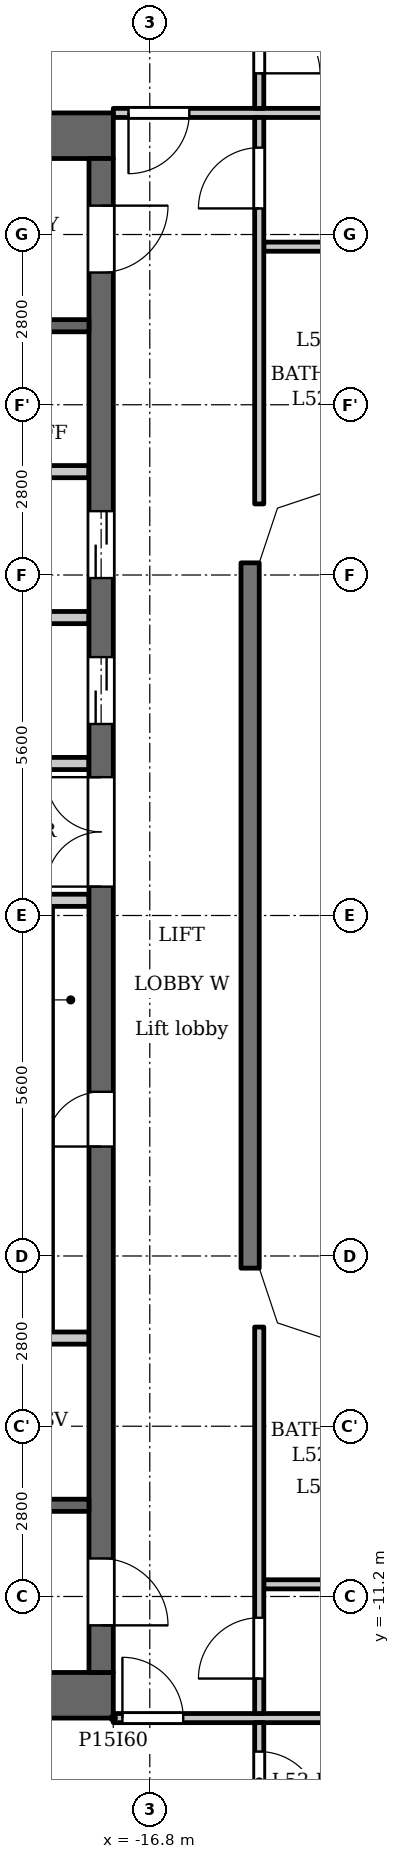
"""IFC4 building model, lengths in metres.
Left out: names, types, materials, properties, quantities, classifications, styles, units other than length and angle.
Written with IfcOpenShell. Run it as: python <this file> out.ifc"""

import sys

from ifc_helpers import new_model, si_unit, direction, frame, frame_2d, origin, place, context, subcontext, project, spatial, polyline, rectangle, outline, extrude, element, fill, save


model = new_model("IFC4")
c1 = context("Model", 3, precision=1e-05, world=origin(), true_north=direction((0.0, 1.0)))
c2 = subcontext(c1, "Body", "Model", "MODEL_VIEW")
j1 = project(units=[si_unit("LENGTHUNIT", "METRE"), si_unit("PLANEANGLEUNIT", "RADIAN")], contexts=[c1])
p1 = place(None, origin())
s1 = spatial("IfcSite", under=j1, at=p1, CompositionType="ELEMENT")
p2 = place(p1, origin())
s2 = spatial("IfcBuilding", under=s1, at=p2, CompositionType="ELEMENT")
p3 = place(p2, frame((0.0, 0.0, 202.9)))
s3 = spatial("IfcBuildingStorey", under=s2, at=p3, CompositionType="ELEMENT", Elevation=202.9)
p4 = place(p3, frame((-15.15, -5.8, 0.0), z_axis=(0.0, 0.0, 1.0), x_axis=(0.0, 1.0, 0.0)))
e1 = element("IfcWall", 1, at=p4, inside=s3, PredefinedType="SOLIDWALL", context=c2, shape_type="SweptSolid", body=[
    extrude(rectangle(XDim=11.6, YDim=0.3, at=frame_2d((5.8, 0.0))), origin(), (0.0, 0.0, 1.0), 3.2),
])
for number, where, z_axis, x_axis in (
    (2, (-17.4, 12.825, 0.0), (0.0, 0.0, 1.0), (-1.0, 0.0, 0.0)),
    (3, (-17.4, -12.825, 0.0), (0.0, 0.0, 1.0), (-1.0, 0.0, 0.0)),
):
    element("IfcWall", number, at=place(p3, frame(where, z_axis=z_axis, x_axis=x_axis)), inside=s3, PredefinedType="SHEAR", context=c2, shape_type="SweptSolid", body=[
        extrude(rectangle(XDim=7.6, YDim=0.75, at=frame_2d((3.8, 0.0))), origin(), (0.0, 0.0, 1.0), 3.2),
    ])
p5 = place(p3, frame((-17.6, -12.45, 0.0), z_axis=(0.0, 0.0, 1.0), x_axis=(0.0, 1.0, 0.0)))
e4 = element("IfcWall", 4, at=p5, inside=s3, PredefinedType="SHEAR", context=c2, shape_type="SweptSolid", body=[
    extrude(rectangle(XDim=24.9, YDim=0.4, at=frame_2d((12.45, 0.0))), origin(), (0.0, 0.0, 1.0), 3.2),
])
p6 = place(p5, frame((8.65, 0.0, 0.0)))
e5 = element("IfcOpeningElement", 5, at=p6, cuts=e4, PredefinedType="OPENING", context=c2, shape_type="SweptSolid", body=[
    extrude(rectangle(XDim=0.9, YDim=2.1, at=frame_2d((0.45, 1.05))), frame((0.0, 0.21, 0.0), z_axis=(0.0, -1.0, 0.0), x_axis=(1.0, 0.0, 0.0)), (0.0, 0.0, 1.0), 0.42),
])
p7 = place(p5, frame((15.6, 0.0, 0.0)))
e6 = element("IfcOpeningElement", 6, at=p7, cuts=e4, PredefinedType="OPENING", context=c2, shape_type="SweptSolid", body=[
    extrude(rectangle(XDim=1.1, YDim=2.1, at=frame_2d((0.55, 1.05))), frame((0.0, 0.21, 0.0), z_axis=(0.0, -1.0, 0.0), x_axis=(1.0, 0.0, 0.0)), (0.0, 0.0, 1.0), 0.42),
])
p8 = place(p5, frame((18.0, 0.0, 0.0)))
e7 = element("IfcOpeningElement", 7, at=p8, cuts=e4, PredefinedType="OPENING", context=c2, shape_type="SweptSolid", body=[
    extrude(rectangle(XDim=1.1, YDim=2.1, at=frame_2d((0.55, 1.05))), frame((0.0, 0.21, 0.0), z_axis=(0.0, -1.0, 0.0), x_axis=(1.0, 0.0, 0.0)), (0.0, 0.0, 1.0), 0.42),
])
p9 = place(p5, frame((23.025, 0.0, 0.0)))
e8 = element("IfcOpeningElement", 8, at=p9, cuts=e4, PredefinedType="OPENING", context=c2, shape_type="SweptSolid", body=[
    extrude(rectangle(XDim=1.1, YDim=2.1, at=frame_2d((0.55, 1.05))), frame((0.0, 0.21, 0.0), z_axis=(0.0, -1.0, 0.0), x_axis=(1.0, 0.0, 0.0)), (0.0, 0.0, 1.0), 0.42),
])
p10 = place(p5, frame((0.775, 0.0, 0.0)))
e9 = element("IfcOpeningElement", 9, at=p10, cuts=e4, PredefinedType="OPENING", context=c2, shape_type="SweptSolid", body=[
    extrude(rectangle(XDim=1.1, YDim=2.1, at=frame_2d((0.55, 1.05))), frame((0.0, 0.21, 0.0), z_axis=(0.0, -1.0, 0.0), x_axis=(1.0, 0.0, 0.0)), (0.0, 0.0, 1.0), 0.42),
])
p11 = place(p5, frame((12.925, 0.0, 0.0)))
e10 = element("IfcOpeningElement", 10, at=p11, cuts=e4, PredefinedType="OPENING", context=c2, shape_type="SweptSolid", body=[
    extrude(rectangle(XDim=1.8, YDim=2.1, at=frame_2d((0.9, 1.05))), frame((0.0, 0.21, 0.0), z_axis=(0.0, -1.0, 0.0), x_axis=(1.0, 0.0, 0.0)), (0.0, 0.0, 1.0), 0.42),
])
p12 = place(p3, frame((-17.8, -9.7, 0.0), z_axis=(0.0, 0.0, 1.0), x_axis=(-1.0, 0.0, 0.0)))
e11 = element("IfcWall", 11, at=p12, inside=s3, PredefinedType="SHEAR", context=c2, shape_type="SweptSolid", body=[
    extrude(rectangle(XDim=5.65, YDim=0.2, at=frame_2d((2.825, 0.0))), origin(), (0.0, 0.0, 1.0), 3.2),
])
p13 = place(p12, frame((0.85, 0.0, 0.0)))
e12 = element("IfcOpeningElement", 12, at=p13, cuts=e11, PredefinedType="OPENING", context=c2, shape_type="SweptSolid", body=[
    extrude(rectangle(XDim=1.1, YDim=2.1, at=frame_2d((0.55, 1.05))), frame((0.0, 0.11, 0.0), z_axis=(0.0, -1.0, 0.0), x_axis=(1.0, 0.0, 0.0)), (0.0, 0.0, 1.0), 0.22),
])
p14 = place(p12, frame((3.75, 0.0, 0.0)))
e13 = element("IfcOpeningElement", 13, at=p14, cuts=e11, PredefinedType="OPENING", context=c2, shape_type="SweptSolid", body=[
    extrude(rectangle(XDim=1.1, YDim=2.1, at=frame_2d((0.55, 1.05))), frame((0.0, 0.11, 0.0), z_axis=(0.0, -1.0, 0.0), x_axis=(1.0, 0.0, 0.0)), (0.0, 0.0, 1.0), 0.22),
])
p15 = place(p3, frame((-17.8, -6.95, 0.0), z_axis=(0.0, 0.0, 1.0), x_axis=(-1.0, 0.0, 0.0)))
e14 = element("IfcWall", 14, at=p15, inside=s3, PredefinedType="PARTITIONING", context=c2, shape_type="SweptSolid", body=[
    extrude(rectangle(XDim=2.8, YDim=0.2, at=frame_2d((1.4, 0.0))), origin(), (0.0, 0.0, 1.0), 3.2),
])
p16 = place(p3, frame((-17.8, 0.25, 0.0), z_axis=(0.0, 0.0, 1.0), x_axis=(-1.0, 0.0, 0.0)))
e15 = element("IfcWall", 15, at=p16, inside=s3, PredefinedType="PARTITIONING", context=c2, shape_type="SweptSolid", body=[
    extrude(rectangle(XDim=3.0, YDim=0.2, at=frame_2d((1.5, 0.0))), origin(), (0.0, 0.0, 1.0), 3.2),
])
p17 = place(p16, frame((1.35, 0.0, 0.0)))
e16 = element("IfcOpeningElement", 16, at=p17, cuts=e15, PredefinedType="OPENING", context=c2, shape_type="SweptSolid", body=[
    extrude(rectangle(XDim=0.9, YDim=2.1, at=frame_2d((0.45, 1.05))), frame((0.0, 0.11, 0.0), z_axis=(0.0, -1.0, 0.0), x_axis=(1.0, 0.0, 0.0)), (0.0, 0.0, 1.0), 0.22),
])
p18 = place(p3, frame((-17.8, 2.5, 0.0), z_axis=(0.0, 0.0, 1.0), x_axis=(-1.0, 0.0, 0.0)))
e17 = element("IfcWall", 17, at=p18, inside=s3, PredefinedType="PARTITIONING", context=c2, shape_type="SweptSolid", body=[
    extrude(rectangle(XDim=3.0, YDim=0.2, at=frame_2d((1.5, 0.0))), origin(), (0.0, 0.0, 1.0), 3.2),
])
for number, where, z_axis, x_axis in (
    (18, (-17.8, 4.9, 0.0), (0.0, 0.0, 1.0), (-1.0, 0.0, 0.0)),
    (19, (-17.8, 7.3, 0.0), (0.0, 0.0, 1.0), (-1.0, 0.0, 0.0)),
):
    element("IfcWall", number, at=place(p3, frame(where, z_axis=z_axis, x_axis=x_axis)), inside=s3, PredefinedType="PARTITIONING", context=c2, shape_type="SweptSolid", body=[
        extrude(rectangle(XDim=2.8, YDim=0.2, at=frame_2d((1.4, 0.0))), origin(), (0.0, 0.0, 1.0), 3.2),
    ])
p19 = place(p3, frame((-17.8, 9.7, 0.0), z_axis=(0.0, 0.0, 1.0), x_axis=(-1.0, 0.0, 0.0)))
e20 = element("IfcWall", 20, at=p19, inside=s3, PredefinedType="SHEAR", context=c2, shape_type="SweptSolid", body=[
    extrude(rectangle(XDim=5.65, YDim=0.2, at=frame_2d((2.825, 0.0))), origin(), (0.0, 0.0, 1.0), 3.2),
])
p20 = place(p19, frame((0.85, 0.0, 0.0)))
e21 = element("IfcOpeningElement", 21, at=p20, cuts=e20, PredefinedType="OPENING", context=c2, shape_type="SweptSolid", body=[
    extrude(rectangle(XDim=1.1, YDim=2.1, at=frame_2d((0.55, 1.05))), frame((0.0, 0.11, 0.0), z_axis=(0.0, -1.0, 0.0), x_axis=(1.0, 0.0, 0.0)), (0.0, 0.0, 1.0), 0.22),
])
p21 = place(p19, frame((3.75, 0.0, 0.0)))
e22 = element("IfcOpeningElement", 22, at=p21, cuts=e20, PredefinedType="OPENING", context=c2, shape_type="SweptSolid", body=[
    extrude(rectangle(XDim=1.1, YDim=2.1, at=frame_2d((0.55, 1.05))), frame((0.0, 0.11, 0.0), z_axis=(0.0, -1.0, 0.0), x_axis=(1.0, 0.0, 0.0)), (0.0, 0.0, 1.0), 0.22),
])
p22 = place(p3, frame((-17.4, -13.2, 0.0), z_axis=(0.0, 0.0, 1.0), x_axis=(1.0, 0.0, 0.0)))
e23 = element("IfcWall", 23, at=p22, inside=s3, PredefinedType="PARTITIONING", context=c2, shape_type="SweptSolid", body=[
    extrude(rectangle(XDim=34.8, YDim=0.15, at=frame_2d((17.4, 0.0))), origin(), (0.0, 0.0, 1.0), 3.2),
])
p23 = place(p22, frame((0.15, 0.0, 0.0)))
e24 = element("IfcOpeningElement", 24, at=p23, cuts=e23, PredefinedType="OPENING", context=c2, shape_type="SweptSolid", body=[
    extrude(rectangle(XDim=1.0, YDim=2.1, at=frame_2d((0.5, 1.05))), frame((0.0, 0.085, 0.0), z_axis=(0.0, -1.0, 0.0), x_axis=(1.0, 0.0, 0.0)), (0.0, 0.0, 1.0), 0.17),
])
p24 = place(p22, frame((33.55, 0.0, 0.0)))
e25 = element("IfcOpeningElement", 25, at=p24, cuts=e23, PredefinedType="OPENING", context=c2, shape_type="SweptSolid", body=[
    extrude(rectangle(XDim=1.0, YDim=2.1, at=frame_2d((0.5, 1.05))), frame((0.0, 0.085, 0.0), z_axis=(0.0, -1.0, 0.0), x_axis=(1.0, 0.0, 0.0)), (0.0, 0.0, 1.0), 0.17),
])
p25 = place(p3, frame((-14.925, -11.0, 0.0), z_axis=(0.0, 0.0, 1.0), x_axis=(1.0, 0.0, 0.0)))
e26 = element("IfcWall", 26, at=p25, inside=s3, PredefinedType="PARTITIONING", context=c2, shape_type="SweptSolid", body=[
    extrude(rectangle(XDim=29.85, YDim=0.15, at=frame_2d((14.925, 0.0))), origin(), (0.0, 0.0, 1.0), 3.2),
])
p26 = place(p25, frame((2.575, 0.0, 0.0)))
e27 = element("IfcOpeningElement", 27, at=p26, cuts=e26, PredefinedType="OPENING", context=c2, shape_type="SweptSolid", body=[
    extrude(rectangle(XDim=1.0, YDim=2.1, at=frame_2d((0.5, 1.05))), frame((0.0, 0.085, 0.0), z_axis=(0.0, -1.0, 0.0), x_axis=(1.0, 0.0, 0.0)), (0.0, 0.0, 1.0), 0.17),
])
p27 = place(p25, frame((26.375, 0.0, 0.0)))
e28 = element("IfcOpeningElement", 28, at=p27, cuts=e26, PredefinedType="OPENING", context=c2, shape_type="SweptSolid", body=[
    extrude(rectangle(XDim=1.0, YDim=2.1, at=frame_2d((0.5, 1.05))), frame((0.0, 0.085, 0.0), z_axis=(0.0, -1.0, 0.0), x_axis=(1.0, 0.0, 0.0)), (0.0, 0.0, 1.0), 0.17),
])
p28 = place(p3, frame((-14.925, 11.0, 0.0), z_axis=(0.0, 0.0, 1.0), x_axis=(1.0, 0.0, 0.0)))
e29 = element("IfcWall", 29, at=p28, inside=s3, PredefinedType="PARTITIONING", context=c2, shape_type="SweptSolid", body=[
    extrude(rectangle(XDim=29.85, YDim=0.15, at=frame_2d((14.925, 0.0))), origin(), (0.0, 0.0, 1.0), 3.2),
])
p29 = place(p28, frame((2.475, 0.0, 0.0)))
e30 = element("IfcOpeningElement", 30, at=p29, cuts=e29, PredefinedType="OPENING", context=c2, shape_type="SweptSolid", body=[
    extrude(rectangle(XDim=1.0, YDim=2.1, at=frame_2d((0.5, 1.05))), frame((0.0, 0.085, 0.0), z_axis=(0.0, -1.0, 0.0), x_axis=(1.0, 0.0, 0.0)), (0.0, 0.0, 1.0), 0.17),
])
p30 = place(p28, frame((17.975, 0.0, 0.0)))
e31 = element("IfcOpeningElement", 31, at=p30, cuts=e29, PredefinedType="OPENING", context=c2, shape_type="SweptSolid", body=[
    extrude(rectangle(XDim=1.0, YDim=2.1, at=frame_2d((0.5, 1.05))), frame((0.0, 0.085, 0.0), z_axis=(0.0, -1.0, 0.0), x_axis=(1.0, 0.0, 0.0)), (0.0, 0.0, 1.0), 0.17),
])
p31 = place(p3, frame((-17.4, 13.2, 0.0), z_axis=(0.0, 0.0, 1.0), x_axis=(1.0, 0.0, 0.0)))
e32 = element("IfcWall", 32, at=p31, inside=s3, PredefinedType="PARTITIONING", context=c2, shape_type="SweptSolid", body=[
    extrude(rectangle(XDim=34.8, YDim=0.15, at=frame_2d((17.4, 0.0))), origin(), (0.0, 0.0, 1.0), 3.2),
])
p32 = place(p31, frame((0.25, 0.0, 0.0)))
e33 = element("IfcOpeningElement", 33, at=p32, cuts=e32, PredefinedType="OPENING", context=c2, shape_type="SweptSolid", body=[
    extrude(rectangle(XDim=1.0, YDim=2.1, at=frame_2d((0.5, 1.05))), frame((0.0, 0.085, 0.0), z_axis=(0.0, -1.0, 0.0), x_axis=(1.0, 0.0, 0.0)), (0.0, 0.0, 1.0), 0.17),
])
p33 = place(p31, frame((33.65, 0.0, 0.0)))
e34 = element("IfcOpeningElement", 34, at=p33, cuts=e32, PredefinedType="OPENING", context=c2, shape_type="SweptSolid", body=[
    extrude(rectangle(XDim=1.0, YDim=2.1, at=frame_2d((0.5, 1.05))), frame((0.0, 0.085, 0.0), z_axis=(0.0, -1.0, 0.0), x_axis=(1.0, 0.0, 0.0)), (0.0, 0.0, 1.0), 0.17),
])
p34 = place(p3, frame((-15.0, -15.325, 0.0), z_axis=(0.0, 0.0, 1.0), x_axis=(0.0, 1.0, 0.0)))
e35 = element("IfcWall", 35, at=p34, inside=s3, PredefinedType="PARTITIONING", context=c2, shape_type="SweptSolid", body=[
    extrude(rectangle(XDim=2.05, YDim=0.15, at=frame_2d((1.025, 0.0))), origin(), (0.0, 0.0, 1.0), 3.2),
])
p35 = place(p34, frame((0.574, 0.0, 0.0)))
e36 = element("IfcOpeningElement", 36, at=p35, cuts=e35, PredefinedType="OPENING", context=c2, shape_type="SweptSolid", body=[
    extrude(rectangle(XDim=1.0, YDim=2.1, at=frame_2d((0.5, 1.05))), frame((0.0, 0.085, 0.0), z_axis=(0.0, -1.0, 0.0), x_axis=(1.0, 0.0, 0.0)), (0.0, 0.0, 1.0), 0.17),
])
p36 = place(p3, frame((-15.0, -13.125, 0.0), z_axis=(0.0, 0.0, 1.0), x_axis=(0.0, 1.0, 0.0)))
e37 = element("IfcWall", 37, at=p36, inside=s3, PredefinedType="PARTITIONING", context=c2, shape_type="SweptSolid", body=[
    extrude(rectangle(XDim=6.356, YDim=0.15, at=frame_2d((3.178, 0.0))), origin(), (0.0, 0.0, 1.0), 3.2),
])
p37 = place(p36, frame((0.575, 0.0, 0.0)))
e38 = element("IfcOpeningElement", 38, at=p37, cuts=e37, PredefinedType="OPENING", context=c2, shape_type="SweptSolid", body=[
    extrude(rectangle(XDim=1.0, YDim=2.1, at=frame_2d((0.5, 1.05))), frame((0.0, 0.085, 0.0), z_axis=(0.0, -1.0, 0.0), x_axis=(1.0, 0.0, 0.0)), (0.0, 0.0, 1.0), 0.17),
])
p38 = place(p3, frame((-15.0, 6.769, 0.0), z_axis=(0.0, 0.0, 1.0), x_axis=(0.0, 1.0, 0.0)))
e39 = element("IfcWall", 39, at=p38, inside=s3, PredefinedType="PARTITIONING", context=c2, shape_type="SweptSolid", body=[
    extrude(rectangle(XDim=6.356, YDim=0.15, at=frame_2d((3.178, 0.0))), origin(), (0.0, 0.0, 1.0), 3.2),
])
p39 = place(p38, frame((4.86, 0.0, 0.0)))
e40 = element("IfcOpeningElement", 40, at=p39, cuts=e39, PredefinedType="OPENING", context=c2, shape_type="SweptSolid", body=[
    extrude(rectangle(XDim=1.0, YDim=2.1, at=frame_2d((0.5, 1.05))), frame((0.0, 0.085, 0.0), z_axis=(0.0, -1.0, 0.0), x_axis=(1.0, 0.0, 0.0)), (0.0, 0.0, 1.0), 0.17),
])
p40 = place(p3, frame((-15.0, 13.275, 0.0), z_axis=(0.0, 0.0, 1.0), x_axis=(0.0, 1.0, 0.0)))
e41 = element("IfcWall", 41, at=p40, inside=s3, PredefinedType="PARTITIONING", context=c2, shape_type="SweptSolid", body=[
    extrude(rectangle(XDim=2.05, YDim=0.15, at=frame_2d((1.025, 0.0))), origin(), (0.0, 0.0, 1.0), 3.2),
])
p41 = place(p40, frame((0.576, 0.0, 0.0)))
e42 = element("IfcOpeningElement", 42, at=p41, cuts=e41, PredefinedType="OPENING", context=c2, shape_type="SweptSolid", body=[
    extrude(rectangle(XDim=1.0, YDim=2.1, at=frame_2d((0.5, 1.05))), frame((0.0, 0.085, 0.0), z_axis=(0.0, -1.0, 0.0), x_axis=(1.0, 0.0, 0.0)), (0.0, 0.0, 1.0), 0.17),
])
p42 = place(p3, origin())
e43 = element("IfcWall", 43, at=p42, inside=s3, PredefinedType="SOLIDWALL", context=c2, shape_type="SweptSolid", body=[
    extrude(outline(polyline([(-13.849, 7.3), (-14.937, 6.937), (-15.3, 5.849), (-15.3, 5.8), (-15.0, 5.8), (-14.7, 6.7), (-13.8, 7.0), (-13.8, 7.3), (-13.849, 7.3)])), origin(), (0.0, 0.0, 1.0), 3.2),
])
e44 = element("IfcWall", 44, at=p42, inside=s3, PredefinedType="SOLIDWALL", context=c2, shape_type="SweptSolid", body=[
    extrude(outline(polyline([(-14.937, -6.937), (-13.849, -7.3), (-13.8, -7.3), (-13.8, -7.0), (-14.7, -6.7), (-15.0, -5.8), (-15.3, -5.8), (-15.3, -5.849), (-14.937, -6.937)])), origin(), (0.0, 0.0, 1.0), 3.2),
])
p43 = place(p6, origin())
e45 = element("IfcDoor", 45, at=p43, inside=s3, OperationType="SINGLE_SWING_RIGHT", PredefinedType="DOOR", context=c2, shape_type="SweptSolid", body=[
    extrude(rectangle(XDim=0.9, YDim=2.1, at=frame_2d((0.45, 1.05))), frame((0.0, 0.025, 0.0), z_axis=(0.0, -1.0, 0.0), x_axis=(1.0, 0.0, 0.0)), (0.0, 0.0, 1.0), 0.05),
])
fill(e5, e45)
p44 = place(p7, origin())
e46 = element("IfcDoor", 46, at=p44, inside=s3, OperationType="DOUBLE_DOOR_SLIDING", PredefinedType="DOOR", context=c2, shape_type="SweptSolid", body=[
    extrude(rectangle(XDim=1.1, YDim=2.1, at=frame_2d((0.55, 1.05))), frame((0.0, 0.025, 0.0), z_axis=(0.0, -1.0, 0.0), x_axis=(1.0, 0.0, 0.0)), (0.0, 0.0, 1.0), 0.05),
])
fill(e6, e46)
p45 = place(p8, origin())
e47 = element("IfcDoor", 47, at=p45, inside=s3, OperationType="DOUBLE_DOOR_SLIDING", PredefinedType="DOOR", context=c2, shape_type="SweptSolid", body=[
    extrude(rectangle(XDim=1.1, YDim=2.1, at=frame_2d((0.55, 1.05))), frame((0.0, 0.025, 0.0), z_axis=(0.0, -1.0, 0.0), x_axis=(1.0, 0.0, 0.0)), (0.0, 0.0, 1.0), 0.05),
])
fill(e7, e47)
p46 = place(p9, origin())
e48 = element("IfcDoor", 48, at=p46, inside=s3, OperationType="SINGLE_SWING_RIGHT", PredefinedType="DOOR", context=c2, shape_type="SweptSolid", body=[
    extrude(rectangle(XDim=1.1, YDim=2.1, at=frame_2d((0.55, 1.05))), frame((0.0, 0.025, 0.0), z_axis=(0.0, -1.0, 0.0), x_axis=(1.0, 0.0, 0.0)), (0.0, 0.0, 1.0), 0.05),
])
fill(e8, e48)
p47 = place(p10, origin())
e49 = element("IfcDoor", 49, at=p47, inside=s3, OperationType="SINGLE_SWING_LEFT", PredefinedType="DOOR", context=c2, shape_type="SweptSolid", body=[
    extrude(rectangle(XDim=1.1, YDim=2.1, at=frame_2d((0.55, 1.05))), frame((0.0, 0.025, 0.0), z_axis=(0.0, -1.0, 0.0), x_axis=(1.0, 0.0, 0.0)), (0.0, 0.0, 1.0), 0.05),
])
fill(e9, e49)
p48 = place(p11, origin())
e50 = element("IfcDoor", 50, at=p48, inside=s3, OperationType="DOUBLE_DOOR_SINGLE_SWING", PredefinedType="DOOR", context=c2, shape_type="SweptSolid", body=[
    extrude(rectangle(XDim=1.8, YDim=2.1, at=frame_2d((0.9, 1.05))), frame((0.0, 0.025, 0.0), z_axis=(0.0, -1.0, 0.0), x_axis=(1.0, 0.0, 0.0)), (0.0, 0.0, 1.0), 0.05),
])
fill(e10, e50)
p49 = place(p39, origin())
e51 = element("IfcDoor", 51, at=p49, inside=s3, OperationType="SINGLE_SWING_RIGHT", PredefinedType="DOOR", context=c2, shape_type="SweptSolid", body=[
    extrude(rectangle(XDim=1.0, YDim=2.1, at=frame_2d((0.5, 1.05))), frame((0.0, 0.025, 0.0), z_axis=(0.0, -1.0, 0.0), x_axis=(1.0, 0.0, 0.0)), (0.0, 0.0, 1.0), 0.05),
])
fill(e40, e51)
p50 = place(p32, origin())
e52 = element("IfcDoor", 52, at=p50, inside=s3, OperationType="SINGLE_SWING_LEFT", PredefinedType="DOOR", context=c2, shape_type="SweptSolid", body=[
    extrude(rectangle(XDim=1.0, YDim=2.1, at=frame_2d((0.5, 1.05))), frame((0.0, 0.025, 0.0), z_axis=(0.0, -1.0, 0.0), x_axis=(1.0, 0.0, 0.0)), (0.0, 0.0, 1.0), 0.05),
])
fill(e33, e52)
p51 = place(p37, origin())
e53 = element("IfcDoor", 53, at=p51, inside=s3, OperationType="SINGLE_SWING_RIGHT", PredefinedType="DOOR", context=c2, shape_type="SweptSolid", body=[
    extrude(rectangle(XDim=1.0, YDim=2.1, at=frame_2d((0.5, 1.05))), frame((0.0, 0.025, 0.0), z_axis=(0.0, -1.0, 0.0), x_axis=(1.0, 0.0, 0.0)), (0.0, 0.0, 1.0), 0.05),
])
fill(e38, e53)
p52 = place(p23, origin())
e54 = element("IfcDoor", 54, at=p52, inside=s3, OperationType="SINGLE_SWING_RIGHT", PredefinedType="DOOR", context=c2, shape_type="SweptSolid", body=[
    extrude(rectangle(XDim=1.0, YDim=2.1, at=frame_2d((0.5, 1.05))), frame((0.0, 0.025, 0.0), z_axis=(0.0, -1.0, 0.0), x_axis=(1.0, 0.0, 0.0)), (0.0, 0.0, 1.0), 0.05),
])
fill(e24, e54)
p53 = place(p41, origin())
e55 = element("IfcDoor", 55, at=p53, inside=s3, OperationType="SINGLE_SWING_LEFT", PredefinedType="DOOR", context=c2, shape_type="SweptSolid", body=[
    extrude(rectangle(XDim=1.0, YDim=2.1, at=frame_2d((0.5, 1.05))), frame((0.0, 0.025, 0.0), z_axis=(0.0, -1.0, 0.0), x_axis=(1.0, 0.0, 0.0)), (0.0, 0.0, 1.0), 0.05),
])
fill(e42, e55)
p54 = place(p35, origin())
e56 = element("IfcDoor", 56, at=p54, inside=s3, OperationType="SINGLE_SWING_LEFT", PredefinedType="DOOR", context=c2, shape_type="SweptSolid", body=[
    extrude(rectangle(XDim=1.0, YDim=2.1, at=frame_2d((0.5, 1.05))), frame((0.0, 0.025, 0.0), z_axis=(0.0, -1.0, 0.0), x_axis=(1.0, 0.0, 0.0)), (0.0, 0.0, 1.0), 0.05),
])
fill(e36, e56)
save(model, sys.argv[1])
